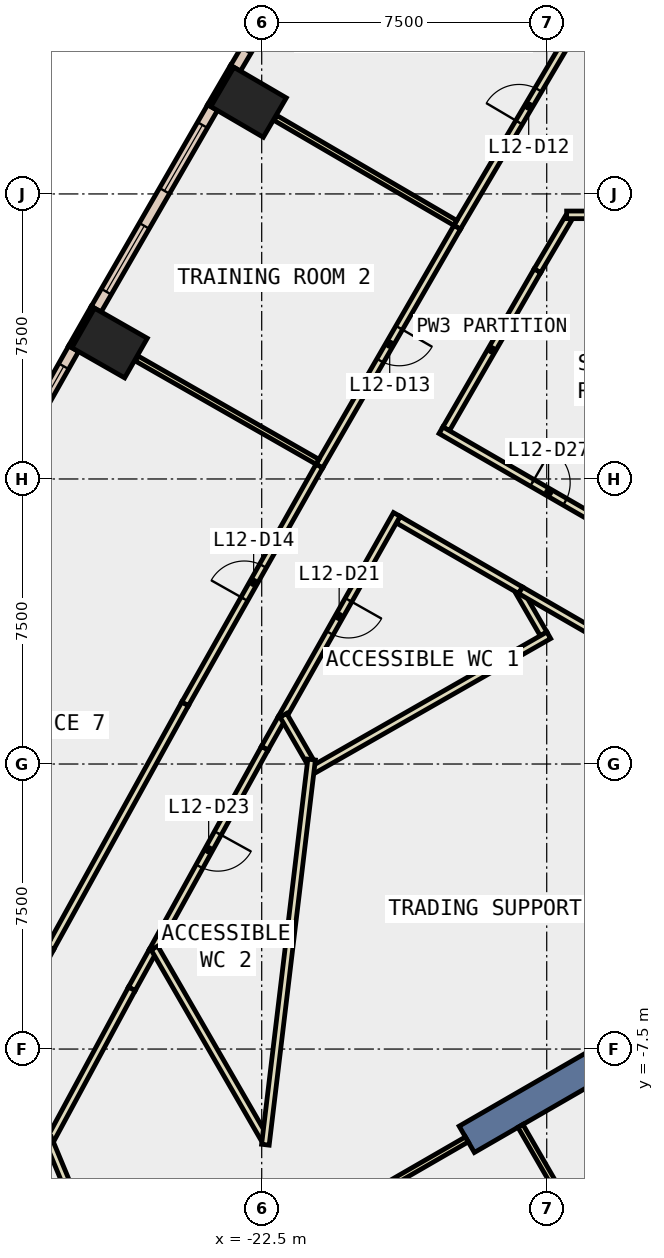
"""IFC4 building model, lengths in metres.
Left out: names, types, materials, properties, quantities, classifications, styles, units other than length and angle.
Written with IfcOpenShell. Run it as: python <this file> out.ifc"""

import sys

from ifc_helpers import new_model, si_unit, direction, frame, frame_2d, origin, origin_2d, place, context, subcontext, project, spatial, rectangle, extrude, element, fill, save


model = new_model("IFC4")
c1 = context("Model", 3, precision=1e-05, world=origin(), true_north=direction((0.0, 1.0)))
c2 = subcontext(c1, "Body", "Model", "MODEL_VIEW")
j1 = project(units=[si_unit("LENGTHUNIT", "METRE"), si_unit("PLANEANGLEUNIT", "RADIAN")], contexts=[c1])
p1 = place(None, origin())
s1 = spatial("IfcSite", under=j1, at=p1, CompositionType="ELEMENT")
p2 = place(p1, origin())
s2 = spatial("IfcBuilding", under=s1, at=p2, CompositionType="ELEMENT")
p3 = place(p2, frame((0.0, 0.0, 60.2)))
s3 = spatial("IfcBuildingStorey", under=s2, at=p3, CompositionType="ELEMENT", Elevation=60.2)
for number, where, z_axis, x_axis in (
    (1, (-22.846, 17.413, -0.4), (0.0, 0.0, 1.0), (0.504, 0.864, 0.0)),
    (2, (-26.503, 11.078, -0.4), (0.0, 0.0, 1.0), (0.496, 0.869, 0.0)),
):
    element("IfcColumn", number, at=place(p3, frame(where, z_axis=z_axis, x_axis=x_axis)), inside=s3, PredefinedType="COLUMN", context=c2, shape_type="SweptSolid", body=[
        extrude(rectangle(XDim=1.2, YDim=1.6, at=origin_2d()), origin(), (0.0, 0.0, 1.0), 4.2),
    ])
p4 = place(p3, frame((-9.31, -5.375, -0.4), z_axis=(0.0, 0.0, 1.0), x_axis=(-0.866017533419, -0.500013631625, 0.0)))
e3 = element("IfcWall", 3, at=p4, inside=s3, PredefinedType="SHEAR", context=c2, shape_type="SweptSolid", body=[
    extrude(rectangle(XDim=9.0, YDim=0.8, at=frame_2d((4.5, 0.0))), origin(), (0.0, 0.0, 1.0), 4.2),
])
p5 = place(p3, frame((-23.277, 18.36, 0.0), z_axis=(0.0, 0.0, 1.0), x_axis=(-0.504225229382, -0.863572184623, 0.0)))
e4 = element("IfcWall", 4, at=p5, inside=s3, PredefinedType="STANDARD", context=c2, shape_type="SweptSolid", body=[
    extrude(rectangle(XDim=1.2, YDim=0.1, at=frame_2d((0.6, 0.0))), origin(), (0.0, 0.0, 1.0), 3.8),
])
p6 = place(p3, frame((-26.944, 12.02, 0.0), z_axis=(0.0, 0.0, 1.0), x_axis=(-0.495854054996, -0.868405870629, 0.0)))
e5 = element("IfcWall", 5, at=p6, inside=s3, PredefinedType="STANDARD", context=c2, shape_type="SweptSolid", body=[
    extrude(rectangle(XDim=1.2, YDim=0.1, at=frame_2d((0.6, 0.0))), origin(), (0.0, 0.0, 1.0), 3.8),
])
p7 = place(p3, frame((-20.076, 23.583, 0.0), z_axis=(0.0, 0.0, 1.0), x_axis=(-0.508163938648, -0.861260362177, 0.0)))
e6 = element("IfcWall", 6, at=p7, inside=s3, PredefinedType="STANDARD", context=c2, shape_type="SweptSolid", body=[
    extrude(rectangle(XDim=6.126, YDim=0.3, at=frame_2d((3.063, 0.0))), origin(), (0.0, 0.0, 1.0), 3.8),
])
p8 = place(p7, frame((0.531, 0.0, 0.9)))
e7 = element("IfcOpeningElement", 7, at=p8, cuts=e6, PredefinedType="OPENING", context=c2, shape_type="SweptSolid", body=[
    extrude(rectangle(XDim=2.0, YDim=2.6, at=frame_2d((1.0, 1.3))), frame((0.0, 0.16, 0.0), z_axis=(0.0, -1.0, 0.0), x_axis=(1.0, 0.0, 0.0)), (0.0, 0.0, 1.0), 0.32),
])
p9 = place(p7, frame((3.594, 0.0, 0.9)))
e8 = element("IfcOpeningElement", 8, at=p9, cuts=e6, PredefinedType="OPENING", context=c2, shape_type="SweptSolid", body=[
    extrude(rectangle(XDim=2.0, YDim=2.6, at=frame_2d((1.0, 1.3))), frame((0.0, 0.16, 0.0), z_axis=(0.0, -1.0, 0.0), x_axis=(1.0, 0.0, 0.0)), (0.0, 0.0, 1.0), 0.32),
])
p10 = place(p3, frame((-23.793, 17.273, 0.0), z_axis=(0.0, 0.0, 1.0), x_axis=(-0.499903021601, -0.86608138705, 0.0)))
e9 = element("IfcWall", 9, at=p10, inside=s3, PredefinedType="STANDARD", context=c2, shape_type="SweptSolid", body=[
    extrude(rectangle(XDim=6.125, YDim=0.3, at=frame_2d((3.062, 0.0))), origin(), (0.0, 0.0, 1.0), 3.8),
])
p11 = place(p10, frame((0.531, 0.0, 0.9)))
e10 = element("IfcOpeningElement", 10, at=p11, cuts=e9, PredefinedType="OPENING", context=c2, shape_type="SweptSolid", body=[
    extrude(rectangle(XDim=2.0, YDim=2.6, at=frame_2d((1.0, 1.3))), frame((0.0, 0.16, 0.0), z_axis=(0.0, -1.0, 0.0), x_axis=(1.0, 0.0, 0.0)), (0.0, 0.0, 1.0), 0.32),
])
p12 = place(p10, frame((3.594, 0.0, 0.9)))
e11 = element("IfcOpeningElement", 11, at=p12, cuts=e9, PredefinedType="OPENING", context=c2, shape_type="SweptSolid", body=[
    extrude(rectangle(XDim=2.0, YDim=2.6, at=frame_2d((1.0, 1.3))), frame((0.0, 0.16, 0.0), z_axis=(0.0, -1.0, 0.0), x_axis=(1.0, 0.0, 0.0)), (0.0, 0.0, 1.0), 0.32),
])
p13 = place(p3, frame((-27.449, 10.928, 0.0), z_axis=(0.0, 0.0, 1.0), x_axis=(-0.491887822214, -0.870658584267, 0.0)))
e12 = element("IfcWall", 12, at=p13, inside=s3, PredefinedType="STANDARD", context=c2, shape_type="SweptSolid", body=[
    extrude(rectangle(XDim=6.125, YDim=0.3, at=frame_2d((3.062, 0.0))), origin(), (0.0, 0.0, 1.0), 3.8),
])
p14 = place(p13, frame((0.531, 0.0, 0.9)))
e13 = element("IfcOpeningElement", 13, at=p14, cuts=e12, PredefinedType="OPENING", context=c2, shape_type="SweptSolid", body=[
    extrude(rectangle(XDim=2.0, YDim=2.6, at=frame_2d((1.0, 1.3))), frame((0.0, 0.16, 0.0), z_axis=(0.0, -1.0, 0.0), x_axis=(1.0, 0.0, 0.0)), (0.0, 0.0, 1.0), 0.32),
])
p15 = place(p13, frame((3.594, 0.0, 0.9)))
e14 = element("IfcOpeningElement", 14, at=p15, cuts=e12, PredefinedType="OPENING", context=c2, shape_type="SweptSolid", body=[
    extrude(rectangle(XDim=2.0, YDim=2.6, at=frame_2d((1.0, 1.3))), frame((0.0, 0.16, 0.0), z_axis=(0.0, -1.0, 0.0), x_axis=(1.0, 0.0, 0.0)), (0.0, 0.0, 1.0), 0.32),
])
p16 = place(p3, frame((-14.427, 14.364, 0.0), z_axis=(0.0, 0.0, 1.0), x_axis=(-0.508509719672, -0.861056249614, 0.0)))
e15 = element("IfcWall", 15, at=p16, inside=s3, PredefinedType="PARTITIONING", context=c2, shape_type="SweptSolid", body=[
    extrude(rectangle(XDim=1.611, YDim=0.2, at=frame_2d((0.805, 0.0))), origin(), (0.0, 0.0, 1.0), 3.8),
])
p17 = place(p3, frame((-15.246, 12.977, 0.0), z_axis=(0.0, 0.0, 1.0), x_axis=(-0.499891203561, -0.866088208327, 0.0)))
e16 = element("IfcWall", 16, at=p17, inside=s3, PredefinedType="PARTITIONING", context=c2, shape_type="SweptSolid", body=[
    extrude(rectangle(XDim=4.801, YDim=0.2, at=frame_2d((2.4, 0.0))), origin(), (0.0, 0.0, 1.0), 3.8),
])
p18 = place(p3, frame((-17.783, 8.783, 0.0), z_axis=(0.0, 0.0, 1.0), x_axis=(0.866041598752, -0.499971948444, 0.0)))
e17 = element("IfcWall", 17, at=p18, inside=s3, PredefinedType="PARTITIONING", context=c2, shape_type="SweptSolid", body=[
    extrude(rectangle(XDim=6.042, YDim=0.2, at=frame_2d((3.021, 0.0))), origin(), (0.0, 0.0, 1.0), 3.8),
])
p19 = place(p18, frame((2.771, 0.0, 0.0)))
e18 = element("IfcOpeningElement", 18, at=p19, cuts=e17, PredefinedType="OPENING", context=c2, shape_type="SweptSolid", body=[
    extrude(rectangle(XDim=1.0, YDim=2.1, at=frame_2d((0.5, 1.05))), frame((0.0, 0.11, 0.0), z_axis=(0.0, -1.0, 0.0), x_axis=(1.0, 0.0, 0.0)), (0.0, 0.0, 1.0), 0.22),
])
p20 = place(p3, frame((-15.687, 4.571, 0.0), z_axis=(0.0, 0.0, 1.0), x_axis=(-0.866044530317, 0.49996687041, 0.0)))
e19 = element("IfcWall", 19, at=p20, inside=s3, PredefinedType="PARTITIONING", context=c2, shape_type="SweptSolid", body=[
    extrude(rectangle(XDim=3.718, YDim=0.2, at=frame_2d((1.859, 0.0))), origin(), (0.0, 0.0, 1.0), 3.8),
])
p21 = place(p3, frame((-18.945, 6.567, 0.0), z_axis=(0.0, 0.0, 1.0), x_axis=(-0.491840751019, -0.87068517596, 0.0)))
e20 = element("IfcWall", 20, at=p21, inside=s3, PredefinedType="PARTITIONING", context=c2, shape_type="SweptSolid", body=[
    extrude(rectangle(XDim=6.168, YDim=0.2, at=frame_2d((3.084, 0.0))), origin(), (0.0, 0.0, 1.0), 3.8),
])
p22 = place(p21, frame((2.584, 0.0, 0.0)))
e21 = element("IfcOpeningElement", 21, at=p22, cuts=e20, PredefinedType="OPENING", context=c2, shape_type="SweptSolid", body=[
    extrude(rectangle(XDim=1.0, YDim=2.1, at=frame_2d((0.5, 1.05))), frame((0.0, 0.11, 0.0), z_axis=(0.0, -1.0, 0.0), x_axis=(1.0, 0.0, 0.0)), (0.0, 0.0, 1.0), 0.22),
])
p23 = place(p3, frame((-25.371, -4.927, 0.0), z_axis=(0.0, 0.0, 1.0), x_axis=(-0.483899488004, -0.875123582993, 0.0)))
e22 = element("IfcWall", 22, at=p23, inside=s3, PredefinedType="PARTITIONING", context=c2, shape_type="SweptSolid", body=[
    extrude(rectangle(XDim=1.13, YDim=0.2, at=frame_2d((0.565, 0.0))), origin(), (0.0, 0.0, 1.0), 3.8),
])
p24 = place(p3, frame((-25.918, -5.916, 0.0), z_axis=(0.0, 0.0, 1.0), x_axis=(-0.4752384902, -0.879857021016, 0.0)))
e23 = element("IfcWall", 23, at=p24, inside=s3, PredefinedType="PARTITIONING", context=c2, shape_type="SweptSolid", body=[
    extrude(rectangle(XDim=4.473, YDim=0.2, at=frame_2d((2.237, 0.0))), origin(), (0.0, 0.0, 1.0), 3.8),
])
p25 = place(p3, frame((-21.979, 1.196, 0.0), z_axis=(0.0, 0.0, 1.0), x_axis=(-0.491617674369, -0.870811151886, 0.0)))
e24 = element("IfcWall", 24, at=p25, inside=s3, PredefinedType="PARTITIONING", context=c2, shape_type="SweptSolid", body=[
    extrude(rectangle(XDim=0.897, YDim=0.2, at=frame_2d((0.448, 0.0))), origin(), (0.0, 0.0, 1.0), 3.8),
])
p26 = place(p3, frame((-22.42, 0.415, 0.0), z_axis=(0.0, 0.0, 1.0), x_axis=(-0.483559496818, -0.875311494861, 0.0)))
e25 = element("IfcWall", 25, at=p26, inside=s3, PredefinedType="PARTITIONING", context=c2, shape_type="SweptSolid", body=[
    extrude(rectangle(XDim=6.103, YDim=0.2, at=frame_2d((3.052, 0.0))), origin(), (0.0, 0.0, 1.0), 3.8),
])
p27 = place(p26, frame((2.552, 0.0, 0.0)))
e26 = element("IfcOpeningElement", 26, at=p27, cuts=e25, PredefinedType="OPENING", context=c2, shape_type="SweptSolid", body=[
    extrude(rectangle(XDim=1.0, YDim=2.1, at=frame_2d((0.5, 1.05))), frame((0.0, 0.11, 0.0), z_axis=(0.0, -1.0, 0.0), x_axis=(1.0, 0.0, 0.0)), (0.0, 0.0, 1.0), 0.22),
])
p28 = place(p3, frame((-17.357, 14.122, 0.0), z_axis=(0.0, 0.0, 1.0), x_axis=(0.508298575594, 0.861180909014, 0.0)))
e27 = element("IfcWall", 27, at=p28, inside=s3, PredefinedType="PARTITIONING", context=c2, shape_type="SweptSolid", body=[
    extrude(rectangle(XDim=7.258, YDim=0.2, at=frame_2d((3.629, 0.0))), origin(), (0.0, 0.0, 1.0), 3.8),
])
p29 = place(p28, frame((3.204, 0.0, 0.0)))
e28 = element("IfcOpeningElement", 28, at=p29, cuts=e27, PredefinedType="OPENING", context=c2, shape_type="SweptSolid", body=[
    extrude(rectangle(XDim=1.0, YDim=2.1, at=frame_2d((0.5, 1.05))), frame((0.0, 0.11, 0.0), z_axis=(0.0, -1.0, 0.0), x_axis=(1.0, 0.0, 0.0)), (0.0, 0.0, 1.0), 0.22),
])
p30 = place(p3, frame((-17.356, 14.122, 0.0), z_axis=(0.0, 0.0, 1.0), x_axis=(-0.499946764175, -0.866056137321, 0.0)))
e29 = element("IfcWall", 29, at=p30, inside=s3, PredefinedType="PARTITIONING", context=c2, shape_type="SweptSolid", body=[
    extrude(rectangle(XDim=7.255, YDim=0.2, at=frame_2d((3.627, 0.0))), origin(), (0.0, 0.0, 1.0), 3.8),
])
p31 = place(p30, frame((3.052, 0.0, 0.0)))
e30 = element("IfcOpeningElement", 30, at=p31, cuts=e29, PredefinedType="OPENING", context=c2, shape_type="SweptSolid", body=[
    extrude(rectangle(XDim=1.0, YDim=2.1, at=frame_2d((0.5, 1.05))), frame((0.0, 0.11, 0.0), z_axis=(0.0, -1.0, 0.0), x_axis=(1.0, 0.0, 0.0)), (0.0, 0.0, 1.0), 0.22),
])
p32 = place(p3, frame((-28.06, -4.831, 0.0), z_axis=(0.0, 0.0, 1.0), x_axis=(0.483631054848, 0.875271959328, 0.0)))
e31 = element("IfcWall", 31, at=p32, inside=s3, PredefinedType="PARTITIONING", context=c2, shape_type="SweptSolid", body=[
    extrude(rectangle(XDim=7.33, YDim=0.2, at=frame_2d((3.665, 0.0))), origin(), (0.0, 0.0, 1.0), 3.8),
])
p33 = place(p3, frame((-24.515, 1.585, 0.0), z_axis=(0.0, 0.0, 1.0), x_axis=(0.49174361417, 0.870740040381, 0.0)))
e32 = element("IfcWall", 32, at=p33, inside=s3, PredefinedType="PARTITIONING", context=c2, shape_type="SweptSolid", body=[
    extrude(rectangle(XDim=7.183, YDim=0.2, at=frame_2d((3.591, 0.0))), origin(), (0.0, 0.0, 1.0), 3.8),
])
p34 = place(p33, frame((3.166, 0.0, 0.0)))
e33 = element("IfcOpeningElement", 33, at=p34, cuts=e32, PredefinedType="OPENING", context=c2, shape_type="SweptSolid", body=[
    extrude(rectangle(XDim=1.0, YDim=2.1, at=frame_2d((0.5, 1.05))), frame((0.0, 0.11, 0.0), z_axis=(0.0, -1.0, 0.0), x_axis=(1.0, 0.0, 0.0)), (0.0, 0.0, 1.0), 0.22),
])
p35 = place(p3, frame((-31.509, -11.216, 0.0), z_axis=(0.0, 0.0, 1.0), x_axis=(0.475367159168, 0.879787510701, 0.0)))
e34 = element("IfcWall", 34, at=p35, inside=s3, PredefinedType="PARTITIONING", context=c2, shape_type="SweptSolid", body=[
    extrude(rectangle(XDim=7.257, YDim=0.2, at=frame_2d((3.629, 0.0))), origin(), (0.0, 0.0, 1.0), 3.8),
])
p36 = place(p35, frame((3.203, 0.0, 0.0)))
e35 = element("IfcOpeningElement", 35, at=p36, cuts=e34, PredefinedType="OPENING", context=c2, shape_type="SweptSolid", body=[
    extrude(rectangle(XDim=1.0, YDim=2.1, at=frame_2d((0.5, 1.05))), frame((0.0, 0.11, 0.0), z_axis=(0.0, -1.0, 0.0), x_axis=(1.0, 0.0, 0.0)), (0.0, 0.0, 1.0), 0.22),
])
p37 = place(p3, frame((-6.957, 14.45, 0.0), z_axis=(0.0, 0.0, 1.0), x_axis=(-1.0, 0.0, 0.0)))
e36 = element("IfcWall", 36, at=p37, inside=s3, PredefinedType="PARTITIONING", context=c2, shape_type="SweptSolid", body=[
    extrude(rectangle(XDim=7.519, YDim=0.2, at=frame_2d((3.76, 0.0))), origin(), (0.0, 0.0, 1.0), 3.8),
])
p38 = place(p3, frame((-15.724, 4.534, 0.0), z_axis=(0.0, 0.0, 1.0), x_axis=(0.500195085719, -0.865912741691, 0.0)))
e37 = element("IfcWall", 37, at=p38, inside=s3, PredefinedType="PARTITIONING", context=c2, shape_type="SweptSolid", body=[
    extrude(rectangle(XDim=1.282, YDim=0.2, at=frame_2d((0.641, 0.0))), origin(), (0.0, 0.0, 1.0), 3.8),
])
p39 = place(p3, frame((-14.946, 3.387, 0.0), z_axis=(0.0, 0.0, 1.0), x_axis=(-0.868556003823, -0.4955910292, 0.0)))
e38 = element("IfcWall", 38, at=p39, inside=s3, PredefinedType="PARTITIONING", context=c2, shape_type="SweptSolid", body=[
    extrude(rectangle(XDim=7.199, YDim=0.2, at=frame_2d((3.6, 0.0))), origin(), (0.0, 0.0, 1.0), 3.8),
])
p40 = place(p3, frame((-21.249, 0.105, 0.0), z_axis=(0.0, 0.0, 1.0), x_axis=(-0.500442009317, 0.865770059144, 0.0)))
e39 = element("IfcWall", 39, at=p40, inside=s3, PredefinedType="PARTITIONING", context=c2, shape_type="SweptSolid", body=[
    extrude(rectangle(XDim=1.361, YDim=0.2, at=frame_2d((0.68, 0.0))), origin(), (0.0, 0.0, 1.0), 3.8),
])
p41 = place(p3, frame((-25.323, -4.84, 0.0), z_axis=(0.0, 0.0, 1.0), x_axis=(0.500070797646, -0.865984524886, 0.0)))
e40 = element("IfcWall", 40, at=p41, inside=s3, PredefinedType="PARTITIONING", context=c2, shape_type="SweptSolid", body=[
    extrude(rectangle(XDim=5.763, YDim=0.2, at=frame_2d((2.882, 0.0))), origin(), (0.0, 0.0, 1.0), 3.8),
])
p42 = place(p3, frame((-22.403, -10.017, 0.0), z_axis=(0.0, 0.0, 1.0), x_axis=(0.119143334217, 0.992877064853, 0.0)))
e41 = element("IfcWall", 41, at=p42, inside=s3, PredefinedType="PARTITIONING", context=c2, shape_type="SweptSolid", body=[
    extrude(rectangle(XDim=10.207, YDim=0.2, at=frame_2d((5.104, 0.0))), origin(), (0.0, 0.0, 1.0), 3.8),
])
p43 = place(p3, frame((-9.801, -19.724, 0.0), z_axis=(0.0, 0.0, 1.0), x_axis=(-0.500005867738, 0.866022016018, 0.0)))
e42 = element("IfcWall", 42, at=p43, inside=s3, PredefinedType="PARTITIONING", context=c2, shape_type="SweptSolid", body=[
    extrude(rectangle(XDim=11.781, YDim=0.15, at=frame_2d((5.891, 0.0))), origin(), (0.0, 0.0, 1.0), 3.8),
])
p44 = place(p3, frame((-17.103, -9.878, 0.0), z_axis=(0.0, 0.0, 1.0), x_axis=(-0.866013358989, -0.500020861617, 0.0)))
e43 = element("IfcWall", 43, at=p44, inside=s3, PredefinedType="PARTITIONING", context=c2, shape_type="SweptSolid", body=[
    extrude(rectangle(XDim=4.674, YDim=0.15, at=frame_2d((2.337, 0.0))), origin(), (0.0, 0.0, 1.0), 3.8),
])
p45 = place(p3, frame((-26.015, -14.946, 0.0), z_axis=(0.0, 0.0, 1.0), x_axis=(-0.383189005855, 0.923669955012, 0.0)))
e44 = element("IfcWall", 44, at=p45, inside=s3, PredefinedType="PARTITIONING", context=c2, shape_type="SweptSolid", body=[
    extrude(rectangle(XDim=5.52, YDim=0.2, at=frame_2d((2.76, 0.0))), origin(), (0.0, 0.0, 1.0), 3.8),
])
p46 = place(p3, frame((-17.405, 14.237, 0.0), z_axis=(0.0, 0.0, 1.0), x_axis=(-0.863614048932, 0.504153522736, 0.0)))
e45 = element("IfcWall", 45, at=p46, inside=s3, PredefinedType="PARTITIONING", context=c2, shape_type="SweptSolid", body=[
    extrude(rectangle(XDim=5.48, YDim=0.15, at=frame_2d((2.74, 0.0))), origin(), (0.0, 0.0, 1.0), 3.8),
])
p47 = place(p3, frame((-21.033, 7.953, 0.0), z_axis=(0.0, 0.0, 1.0), x_axis=(-0.868311678357, 0.496018980715, 0.0)))
e46 = element("IfcWall", 46, at=p47, inside=s3, PredefinedType="PARTITIONING", context=c2, shape_type="SweptSolid", body=[
    extrude(rectangle(XDim=5.48, YDim=0.15, at=frame_2d((2.74, 0.0))), origin(), (0.0, 0.0, 1.0), 3.8),
])
p48 = place(p3, frame((-13.85, 3.51, 0.0), z_axis=(0.0, 0.0, 1.0), x_axis=(-0.865924890849, 0.500174053114, 0.0)))
e47 = element("IfcWall", 47, at=p48, inside=s3, PredefinedType="PARTITIONING", context=c2, shape_type="SweptSolid", body=[
    extrude(rectangle(XDim=2.121, YDim=0.2, at=frame_2d((1.061, 0.0))), origin(), (0.0, 0.0, 1.0), 3.8),
])
p49 = place(p11, origin())
e48 = element("IfcWindow", 48, at=p49, inside=s3, PartitioningType="SINGLE_PANEL", PredefinedType="WINDOW", context=c2, shape_type="SweptSolid", body=[
    extrude(rectangle(XDim=2.0, YDim=2.6, at=frame_2d((1.0, 1.3))), frame((0.0, 0.03, 0.0), z_axis=(0.0, -1.0, 0.0), x_axis=(1.0, 0.0, 0.0)), (0.0, 0.0, 1.0), 0.06),
])
fill(e10, e48)
p50 = place(p12, origin())
e49 = element("IfcWindow", 49, at=p50, inside=s3, PartitioningType="SINGLE_PANEL", PredefinedType="WINDOW", context=c2, shape_type="SweptSolid", body=[
    extrude(rectangle(XDim=2.0, YDim=2.6, at=frame_2d((1.0, 1.3))), frame((0.0, 0.03, 0.0), z_axis=(0.0, -1.0, 0.0), x_axis=(1.0, 0.0, 0.0)), (0.0, 0.0, 1.0), 0.06),
])
fill(e11, e49)
p51 = place(p14, origin())
e50 = element("IfcWindow", 50, at=p51, inside=s3, PartitioningType="SINGLE_PANEL", PredefinedType="WINDOW", context=c2, shape_type="SweptSolid", body=[
    extrude(rectangle(XDim=2.0, YDim=2.6, at=frame_2d((1.0, 1.3))), frame((0.0, 0.03, 0.0), z_axis=(0.0, -1.0, 0.0), x_axis=(1.0, 0.0, 0.0)), (0.0, 0.0, 1.0), 0.06),
])
fill(e13, e50)
p52 = place(p29, origin())
e51 = element("IfcDoor", 51, at=p52, inside=s3, OperationType="SINGLE_SWING_RIGHT", PredefinedType="DOOR", context=c2, shape_type="SweptSolid", body=[
    extrude(rectangle(XDim=1.0, YDim=2.1, at=frame_2d((0.5, 1.05))), frame((0.0, 0.025, 0.0), z_axis=(0.0, -1.0, 0.0), x_axis=(1.0, 0.0, 0.0)), (0.0, 0.0, 1.0), 0.05),
])
fill(e28, e51)
p53 = place(p31, origin())
e52 = element("IfcDoor", 52, at=p53, inside=s3, OperationType="SINGLE_SWING_RIGHT", PredefinedType="DOOR", context=c2, shape_type="SweptSolid", body=[
    extrude(rectangle(XDim=1.0, YDim=2.1, at=frame_2d((0.5, 1.05))), frame((0.0, 0.025, 0.0), z_axis=(0.0, -1.0, 0.0), x_axis=(1.0, 0.0, 0.0)), (0.0, 0.0, 1.0), 0.05),
])
fill(e30, e52)
p54 = place(p34, origin())
e53 = element("IfcDoor", 53, at=p54, inside=s3, OperationType="SINGLE_SWING_RIGHT", PredefinedType="DOOR", context=c2, shape_type="SweptSolid", body=[
    extrude(rectangle(XDim=1.0, YDim=2.1, at=frame_2d((0.5, 1.05))), frame((0.0, 0.025, 0.0), z_axis=(0.0, -1.0, 0.0), x_axis=(1.0, 0.0, 0.0)), (0.0, 0.0, 1.0), 0.05),
])
fill(e33, e53)
p55 = place(p22, origin())
e54 = element("IfcDoor", 54, at=p55, inside=s3, OperationType="SINGLE_SWING_LEFT", PredefinedType="DOOR", context=c2, shape_type="SweptSolid", body=[
    extrude(rectangle(XDim=1.0, YDim=2.1, at=frame_2d((0.5, 1.05))), frame((0.0, 0.025, 0.0), z_axis=(0.0, -1.0, 0.0), x_axis=(1.0, 0.0, 0.0)), (0.0, 0.0, 1.0), 0.05),
])
fill(e21, e54)
p56 = place(p27, origin())
e55 = element("IfcDoor", 55, at=p56, inside=s3, OperationType="SINGLE_SWING_LEFT", PredefinedType="DOOR", context=c2, shape_type="SweptSolid", body=[
    extrude(rectangle(XDim=1.0, YDim=2.1, at=frame_2d((0.5, 1.05))), frame((0.0, 0.025, 0.0), z_axis=(0.0, -1.0, 0.0), x_axis=(1.0, 0.0, 0.0)), (0.0, 0.0, 1.0), 0.05),
])
fill(e26, e55)
p57 = place(p19, origin())
e56 = element("IfcDoor", 56, at=p57, inside=s3, OperationType="SINGLE_SWING_LEFT", PredefinedType="DOOR", context=c2, shape_type="SweptSolid", body=[
    extrude(rectangle(XDim=1.0, YDim=2.1, at=frame_2d((0.5, 1.05))), frame((0.0, 0.025, 0.0), z_axis=(0.0, -1.0, 0.0), x_axis=(1.0, 0.0, 0.0)), (0.0, 0.0, 1.0), 0.05),
])
fill(e18, e56)
save(model, sys.argv[1])
